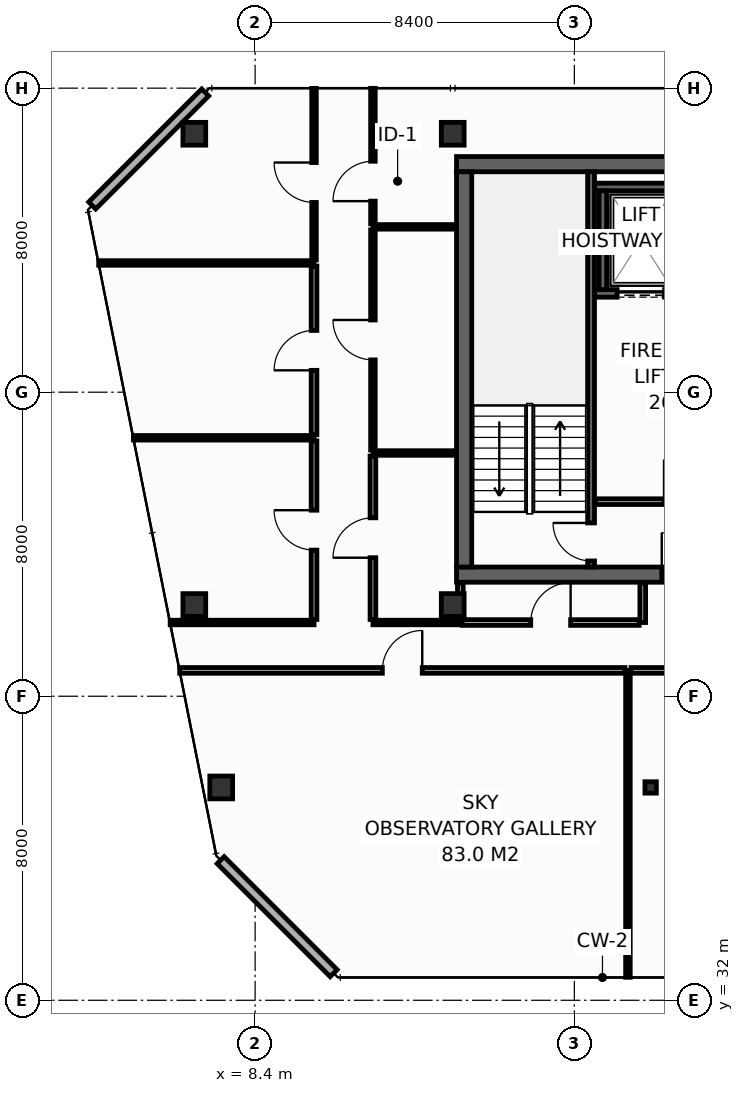
"""IFC4 building model, lengths in metres.
Left out: names, types, materials, properties, quantities, classifications, styles, units other than length and angle.
Written with IfcOpenShell. Run it as: python <this file> out.ifc"""

import sys

from ifc_helpers import new_model, si_unit, direction, frame, frame_2d, origin, origin_2d, place, context, subcontext, project, spatial, rectangle, hollow_rectangle, extrude, element, fill, save


model = new_model("IFC4")
c1 = context("Model", 3, precision=1e-05, world=origin(), true_north=direction((0.0, 1.0)))
c2 = subcontext(c1, "Body", "Model", "MODEL_VIEW")
j1 = project(units=[si_unit("LENGTHUNIT", "METRE"), si_unit("PLANEANGLEUNIT", "RADIAN")], contexts=[c1])
p1 = place(None, origin())
s1 = spatial("IfcSite", under=j1, at=p1, CompositionType="ELEMENT")
p2 = place(p1, origin())
s2 = spatial("IfcBuilding", under=s1, at=p2, CompositionType="ELEMENT")
p3 = place(p2, frame((0.0, 0.0, 299.0)))
s3 = spatial("IfcBuildingStorey", under=s2, at=p3, CompositionType="ELEMENT", Elevation=299.0)
p4 = place(p3, frame((13.7, 43.2, 0.0), z_axis=(0.0, 0.0, 1.0), x_axis=(1.0, 0.0, 0.0)))
e1 = element("IfcWall", 1, at=p4, inside=s3, PredefinedType="SHEAR", context=c2, shape_type="SweptSolid", body=[
    extrude(rectangle(XDim=32.5, YDim=0.4, at=frame_2d((16.25, 0.0))), origin(), (0.0, 0.0, 1.0), 3.55),
])
p5 = place(p4, frame((5.4, 0.0, 0.0)))
e2 = element("IfcOpeningElement", 2, at=p5, cuts=e1, PredefinedType="OPENING", context=c2, shape_type="SweptSolid", body=[
    extrude(rectangle(XDim=1.1, YDim=2.15, at=frame_2d((0.55, 1.075))), frame((0.0, 0.21, 0.0), z_axis=(0.0, -1.0, 0.0), x_axis=(1.0, 0.0, 0.0)), (0.0, 0.0, 1.0), 0.42),
])
p6 = place(p4, frame((25.6, 0.0, 0.0)))
e3 = element("IfcOpeningElement", 3, at=p6, cuts=e1, PredefinedType="OPENING", context=c2, shape_type="SweptSolid", body=[
    extrude(rectangle(XDim=1.1, YDim=2.15, at=frame_2d((0.55, 1.075))), frame((0.0, 0.21, 0.0), z_axis=(0.0, -1.0, 0.0), x_axis=(1.0, 0.0, 0.0)), (0.0, 0.0, 1.0), 0.42),
])
p7 = place(p3, frame((13.7, 54.0, 0.0), z_axis=(0.0, 0.0, 1.0), x_axis=(1.0, 0.0, 0.0)))
e4 = element("IfcWall", 4, at=p7, inside=s3, PredefinedType="SHEAR", context=c2, shape_type="SweptSolid", body=[
    extrude(rectangle(XDim=32.5, YDim=0.4, at=frame_2d((16.25, 0.0))), origin(), (0.0, 0.0, 1.0), 3.55),
])
p8 = place(p3, frame((13.9, 43.4, 0.0), z_axis=(0.0, 0.0, 1.0), x_axis=(0.0, 1.0, 0.0)))
e5 = element("IfcWall", 5, at=p8, inside=s3, PredefinedType="SHEAR", context=c2, shape_type="SweptSolid", body=[
    extrude(rectangle(XDim=10.4, YDim=0.4, at=frame_2d((5.2, 0.0))), origin(), (0.0, 0.0, 1.0), 3.55),
])
for number, where, z_axis, x_axis in (
    (6, (6.8, 54.8, 0.0), (0.0, 0.0, 1.0), (1.0, 0.0, 0.0)),
    (7, (13.6, 54.8, 0.0), (0.0, 0.0, 1.0), (1.0, 0.0, 0.0)),
    (8, (6.8, 42.4, 0.0), (0.0, 0.0, 1.0), (1.0, 0.0, 0.0)),
    (9, (13.6, 42.4, 0.0), (0.0, 0.0, 1.0), (1.0, 0.0, 0.0)),
    (10, (7.508, 37.6, 0.0), (0.0, 0.0, 1.0), (1.0, 0.0, 0.0)),
):
    element("IfcColumn", number, at=place(p3, frame(where, z_axis=z_axis, x_axis=x_axis)), inside=s3, PredefinedType="COLUMN", context=c2, shape_type="SweptSolid", body=[
        extrude(hollow_rectangle(XDim=0.6, YDim=0.6, WallThickness=0.028, at=origin_2d()), origin(), (0.0, 0.0, 1.0), 3.8),
    ])
p9 = place(p3, frame((18.808, 37.6, 0.0), z_axis=(0.0, 0.0, 1.0), x_axis=(1.0, 0.0, 0.0)))
e11 = element("IfcColumn", 11, at=p9, inside=s3, PredefinedType="COLUMN", context=c2, shape_type="SweptSolid", body=[
    extrude(hollow_rectangle(XDim=0.3, YDim=0.3, WallThickness=0.012, at=origin_2d()), origin(), (0.0, 0.0, 1.0), 3.8),
])
p10 = place(p3, frame((17.33, 50.6, 0.0), z_axis=(0.0, 0.0, 1.0), x_axis=(1.0, 0.0, 0.0)))
e12 = element("IfcWall", 12, at=p10, inside=s3, PredefinedType="SHEAR", context=c2, shape_type="SweptSolid", body=[
    extrude(rectangle(XDim=2.52, YDim=0.2, at=frame_2d((1.26, 0.0))), origin(), (0.0, 0.0, 1.0), 3.55),
])
p11 = place(p10, frame((0.595, 0.0, 0.0)))
e13 = element("IfcOpeningElement", 13, at=p11, cuts=e12, PredefinedType="OPENING", context=c2, shape_type="SweptSolid", body=[
    extrude(rectangle(XDim=1.25, YDim=2.3, at=frame_2d((0.625, 1.15))), frame((0.0, 0.11, 0.0), z_axis=(0.0, -1.0, 0.0), x_axis=(1.0, 0.0, 0.0)), (0.0, 0.0, 1.0), 0.22),
])
p12 = place(p3, frame((17.33, 53.4, 0.0), z_axis=(0.0, 0.0, 1.0), x_axis=(1.0, 0.0, 0.0)))
e14 = element("IfcWall", 14, at=p12, inside=s3, PredefinedType="SHEAR", context=c2, shape_type="SweptSolid", body=[
    extrude(rectangle(XDim=2.52, YDim=0.2, at=frame_2d((1.26, 0.0))), origin(), (0.0, 0.0, 1.0), 3.55),
])
p13 = place(p3, frame((17.55, 50.7, 0.0), z_axis=(0.0, 0.0, 1.0), x_axis=(0.0, 1.0, 0.0)))
e15 = element("IfcWall", 15, at=p13, inside=s3, PredefinedType="SHEAR", context=c2, shape_type="SweptSolid", body=[
    extrude(rectangle(XDim=2.6, YDim=0.2, at=frame_2d((1.3, 0.0))), origin(), (0.0, 0.0, 1.0), 3.55),
])
p14 = place(p3, frame((17.24, 43.4, 0.0), z_axis=(0.0, 0.0, 1.0), x_axis=(0.0, 1.0, 0.0)))
e16 = element("IfcWall", 16, at=p14, inside=s3, PredefinedType="SHEAR", context=c2, shape_type="SweptSolid", body=[
    extrude(rectangle(XDim=10.4, YDim=0.18, at=frame_2d((5.2, 0.0))), origin(), (0.0, 0.0, 1.0), 3.55),
])
p15 = place(p14, frame((0.16, 0.0, 0.0)))
e17 = element("IfcOpeningElement", 17, at=p15, cuts=e16, PredefinedType="OPENING", context=c2, shape_type="SweptSolid", body=[
    extrude(rectangle(XDim=1.0, YDim=2.15, at=frame_2d((0.5, 1.075))), frame((0.0, 0.1, 0.0), z_axis=(0.0, -1.0, 0.0), x_axis=(1.0, 0.0, 0.0)), (0.0, 0.0, 1.0), 0.2),
])
p16 = place(p3, frame((17.36, 45.12, 0.0), z_axis=(0.0, 0.0, 1.0), x_axis=(1.0, 0.0, 0.0)))
e18 = element("IfcWall", 18, at=p16, inside=s3, PredefinedType="PARTITIONING", context=c2, shape_type="SweptSolid", body=[
    extrude(rectangle(XDim=5.14, YDim=0.15, at=frame_2d((2.57, 0.0))), origin(), (0.0, 0.0, 1.0), 3.55),
])
p17 = place(p16, frame((1.8, 0.0, 0.0)))
e19 = element("IfcOpeningElement", 19, at=p17, cuts=e18, PredefinedType="OPENING", context=c2, shape_type="SweptSolid", body=[
    extrude(rectangle(XDim=1.1, YDim=2.15, at=frame_2d((0.55, 1.075))), frame((0.0, 0.085, 0.0), z_axis=(0.0, -1.0, 0.0), x_axis=(1.0, 0.0, 0.0)), (0.0, 0.0, 1.0), 0.17),
])
p18 = place(p3, frame((7.493, 35.687, 0.0), z_axis=(0.0, 0.0, 1.0), x_axis=(0.70707775441, -0.707135806771, 0.0)))
e20 = element("IfcWall", 20, at=p18, inside=s3, PredefinedType="STANDARD", context=c2, shape_type="SweptSolid", body=[
    extrude(rectangle(XDim=4.206, YDim=0.26, at=frame_2d((2.103, 0.0))), origin(), (0.0, 0.0, 1.0), 3.55),
])
p19 = place(p3, frame((7.087, 55.887, 0.0), z_axis=(0.0, 0.0, 1.0), x_axis=(-0.707106781187, -0.707106781187, 0.0)))
e21 = element("IfcWall", 21, at=p19, inside=s3, PredefinedType="STANDARD", context=c2, shape_type="SweptSolid", body=[
    extrude(rectangle(XDim=4.206, YDim=0.26, at=frame_2d((2.103, 0.0))), origin(), (0.0, 0.0, 1.0), 3.55),
])
p20 = place(p3, frame((6.164, 41.94, 0.0), z_axis=(0.0, 0.0, 1.0), x_axis=(1.0, 0.0, 0.0)))
e22 = element("IfcWall", 22, at=p20, inside=s3, PredefinedType="PARTITIONING", context=c2, shape_type="SweptSolid", body=[
    extrude(rectangle(XDim=3.786, YDim=0.12, at=frame_2d((1.893, 0.0))), origin(), (0.0, 0.0, 1.0), 3.085),
])
p21 = place(p3, frame((11.5, 41.94, 0.0), z_axis=(0.0, 0.0, 1.0), x_axis=(1.0, 0.0, 0.0)))
e23 = element("IfcWall", 23, at=p21, inside=s3, PredefinedType="PARTITIONING", context=c2, shape_type="SweptSolid", body=[
    extrude(rectangle(XDim=2.35, YDim=0.12, at=frame_2d((1.175, 0.0))), origin(), (0.0, 0.0, 1.0), 3.55),
])
p22 = place(p3, frame((11.5, 52.35, 0.0), z_axis=(0.0, 0.0, 1.0), x_axis=(1.0, 0.0, 0.0)))
e24 = element("IfcWall", 24, at=p22, inside=s3, PredefinedType="PARTITIONING", context=c2, shape_type="SweptSolid", body=[
    extrude(rectangle(XDim=2.18, YDim=0.12, at=frame_2d((1.09, 0.0))), origin(), (0.0, 0.0, 1.0), 3.55),
])
p23 = place(p3, frame((11.5, 52.43, 0.0), z_axis=(0.0, 0.0, 1.0), x_axis=(0.0, 1.0, 0.0)))
e25 = element("IfcWall", 25, at=p23, inside=s3, PredefinedType="PARTITIONING", context=c2, shape_type="SweptSolid", body=[
    extrude(rectangle(XDim=3.565, YDim=0.12, at=frame_2d((1.783, 0.0))), origin(), (0.0, 0.0, 1.0), 2.935),
])
p24 = place(p23, frame((0.597, 0.0, 0.0)))
e26 = element("IfcOpeningElement", 26, at=p24, cuts=e25, PredefinedType="OPENING", context=c2, shape_type="SweptSolid", body=[
    extrude(rectangle(XDim=1.05, YDim=2.15, at=frame_2d((0.525, 1.075))), frame((0.0, 0.07, 0.0), z_axis=(0.0, -1.0, 0.0), x_axis=(1.0, 0.0, 0.0)), (0.0, 0.0, 1.0), 0.14),
])
p25 = place(p3, frame((5.198, 46.8, 0.0), z_axis=(0.0, 0.0, 1.0), x_axis=(1.0, 0.0, 0.0)))
e27 = element("IfcWall", 27, at=p25, inside=s3, PredefinedType="PARTITIONING", context=c2, shape_type="SweptSolid", body=[
    extrude(rectangle(XDim=4.752, YDim=0.12, at=frame_2d((2.376, 0.0))), origin(), (0.0, 0.0, 1.0), 2.947),
])
p26 = place(p3, frame((4.283, 51.4, 0.0), z_axis=(0.0, 0.0, 1.0), x_axis=(1.0, 0.0, 0.0)))
e28 = element("IfcWall", 28, at=p26, inside=s3, PredefinedType="PARTITIONING", context=c2, shape_type="SweptSolid", body=[
    extrude(rectangle(XDim=5.667, YDim=0.12, at=frame_2d((2.833, 0.0))), origin(), (0.0, 0.0, 1.0), 2.947),
])
p27 = place(p3, frame((9.95, 42.02, 0.0), z_axis=(0.0, 0.0, 1.0), x_axis=(0.0, 1.0, 0.0)))
e29 = element("IfcWall", 29, at=p27, inside=s3, PredefinedType="PARTITIONING", context=c2, shape_type="SweptSolid", body=[
    extrude(rectangle(XDim=4.7, YDim=0.15, at=frame_2d((2.35, 0.0))), origin(), (0.0, 0.0, 1.0), 2.947),
])
p28 = place(p27, frame((1.825, 0.0, 0.0)))
e30 = element("IfcOpeningElement", 30, at=p28, cuts=e29, PredefinedType="OPENING", context=c2, shape_type="SweptSolid", body=[
    extrude(rectangle(XDim=1.05, YDim=2.15, at=frame_2d((0.525, 1.075))), frame((0.0, 0.085, 0.0), z_axis=(0.0, -1.0, 0.0), x_axis=(1.0, 0.0, 0.0)), (0.0, 0.0, 1.0), 0.17),
])
p29 = place(p3, frame((9.95, 46.88, 0.0), z_axis=(0.0, 0.0, 1.0), x_axis=(0.0, 1.0, 0.0)))
e31 = element("IfcWall", 31, at=p29, inside=s3, PredefinedType="PARTITIONING", context=c2, shape_type="SweptSolid", body=[
    extrude(rectangle(XDim=4.44, YDim=0.15, at=frame_2d((2.22, 0.0))), origin(), (0.0, 0.0, 1.0), 3.55),
])
p30 = place(p29, frame((1.695, 0.0, 0.0)))
e32 = element("IfcOpeningElement", 32, at=p30, cuts=e31, PredefinedType="OPENING", context=c2, shape_type="SweptSolid", body=[
    extrude(rectangle(XDim=1.05, YDim=2.15, at=frame_2d((0.525, 1.075))), frame((0.0, 0.085, 0.0), z_axis=(0.0, -1.0, 0.0), x_axis=(1.0, 0.0, 0.0)), (0.0, 0.0, 1.0), 0.17),
])
p31 = place(p3, frame((9.95, 51.48, 0.0), z_axis=(0.0, 0.0, 1.0), x_axis=(0.0, 1.0, 0.0)))
e33 = element("IfcWall", 33, at=p31, inside=s3, PredefinedType="PARTITIONING", context=c2, shape_type="SweptSolid", body=[
    extrude(rectangle(XDim=4.515, YDim=0.12, at=frame_2d((2.258, 0.0))), origin(), (0.0, 0.0, 1.0), 2.935),
])
p32 = place(p31, frame((1.513, 0.0, 0.0)))
e34 = element("IfcOpeningElement", 34, at=p32, cuts=e33, PredefinedType="OPENING", context=c2, shape_type="SweptSolid", body=[
    extrude(rectangle(XDim=1.05, YDim=2.15, at=frame_2d((0.525, 1.075))), frame((0.0, 0.07, 0.0), z_axis=(0.0, -1.0, 0.0), x_axis=(1.0, 0.0, 0.0)), (0.0, 0.0, 1.0), 0.14),
])
p33 = place(p3, frame((11.5, 46.4, 0.0), z_axis=(0.0, 0.0, 1.0), x_axis=(1.0, 0.0, 0.0)))
e35 = element("IfcWall", 35, at=p33, inside=s3, PredefinedType="PARTITIONING", context=c2, shape_type="SweptSolid", body=[
    extrude(rectangle(XDim=2.18, YDim=0.12, at=frame_2d((1.09, 0.0))), origin(), (0.0, 0.0, 1.0), 3.55),
])
p34 = place(p3, frame((11.5, 42.02, 0.0), z_axis=(0.0, 0.0, 1.0), x_axis=(0.0, 1.0, 0.0)))
e36 = element("IfcWall", 36, at=p34, inside=s3, PredefinedType="PARTITIONING", context=c2, shape_type="SweptSolid", body=[
    extrude(rectangle(XDim=4.3, YDim=0.15, at=frame_2d((2.15, 0.0))), origin(), (0.0, 0.0, 1.0), 2.947),
])
p35 = place(p34, frame((1.625, 0.0, 0.0)))
e37 = element("IfcOpeningElement", 37, at=p35, cuts=e36, PredefinedType="OPENING", context=c2, shape_type="SweptSolid", body=[
    extrude(rectangle(XDim=1.05, YDim=2.15, at=frame_2d((0.525, 1.075))), frame((0.0, 0.085, 0.0), z_axis=(0.0, -1.0, 0.0), x_axis=(1.0, 0.0, 0.0)), (0.0, 0.0, 1.0), 0.17),
])
p36 = place(p3, frame((11.5, 46.48, 0.0), z_axis=(0.0, 0.0, 1.0), x_axis=(0.0, 1.0, 0.0)))
e38 = element("IfcWall", 38, at=p36, inside=s3, PredefinedType="PARTITIONING", context=c2, shape_type="SweptSolid", body=[
    extrude(rectangle(XDim=5.79, YDim=0.12, at=frame_2d((2.895, 0.0))), origin(), (0.0, 0.0, 1.0), 3.55),
])
p37 = place(p36, frame((2.37, 0.0, 0.0)))
e39 = element("IfcOpeningElement", 39, at=p37, cuts=e38, PredefinedType="OPENING", context=c2, shape_type="SweptSolid", body=[
    extrude(rectangle(XDim=1.05, YDim=2.15, at=frame_2d((0.525, 1.075))), frame((0.0, 0.07, 0.0), z_axis=(0.0, -1.0, 0.0), x_axis=(1.0, 0.0, 0.0)), (0.0, 0.0, 1.0), 0.14),
])
p38 = place(p3, frame((13.8, 42.02, 0.0), z_axis=(0.0, 0.0, 1.0), x_axis=(0.0, 1.0, 0.0)))
e40 = element("IfcWall", 40, at=p38, inside=s3, PredefinedType="PARTITIONING", context=c2, shape_type="SweptSolid", body=[
    extrude(rectangle(XDim=0.96, YDim=0.15, at=frame_2d((0.48, 0.0))), origin(), (0.0, 0.0, 1.0), 3.55),
])
p39 = place(p3, frame((18.6, 41.94, 0.0), z_axis=(0.0, 0.0, 1.0), x_axis=(0.0, 1.0, 0.0)))
e41 = element("IfcWall", 41, at=p39, inside=s3, PredefinedType="PARTITIONING", context=c2, shape_type="SweptSolid", body=[
    extrude(rectangle(XDim=1.04, YDim=0.15, at=frame_2d((0.52, 0.0))), origin(), (0.0, 0.0, 1.0), 3.55),
])
p40 = place(p3, frame((13.85, 41.94, 0.0), z_axis=(0.0, 0.0, 1.0), x_axis=(1.0, 0.0, 0.0)))
e42 = element("IfcWall", 42, at=p40, inside=s3, PredefinedType="PARTITIONING", context=c2, shape_type="SweptSolid", body=[
    extrude(rectangle(XDim=4.655, YDim=0.15, at=frame_2d((2.327, 0.0))), origin(), (0.0, 0.0, 1.0), 3.55),
])
p41 = place(p40, frame((1.802, 0.0, 0.0)))
e43 = element("IfcOpeningElement", 43, at=p41, cuts=e42, PredefinedType="OPENING", context=c2, shape_type="SweptSolid", body=[
    extrude(rectangle(XDim=1.05, YDim=2.15, at=frame_2d((0.525, 1.075))), frame((0.0, 0.085, 0.0), z_axis=(0.0, -1.0, 0.0), x_axis=(1.0, 0.0, 0.0)), (0.0, 0.0, 1.0), 0.17),
])
p42 = place(p3, frame((18.21, 32.605, 0.0), z_axis=(0.0, 0.0, 1.0), x_axis=(0.0, 1.0, 0.0)))
e44 = element("IfcWall", 44, at=p42, inside=s3, PredefinedType="PARTITIONING", context=c2, shape_type="SweptSolid", body=[
    extrude(rectangle(XDim=8.075, YDim=0.12, at=frame_2d((4.038, 0.0))), origin(), (0.0, 0.0, 1.0), 3.047),
])
p43 = place(p3, frame((6.415, 40.68, 0.0), z_axis=(0.0, 0.0, 1.0), x_axis=(1.0, 0.0, 0.0)))
e45 = element("IfcWall", 45, at=p43, inside=s3, PredefinedType="PARTITIONING", context=c2, shape_type="SweptSolid", body=[
    extrude(rectangle(XDim=11.715, YDim=0.15, at=frame_2d((5.857, 0.0))), origin(), (0.0, 0.0, 1.0), 3.085),
])
p44 = place(p43, frame((5.333, 0.0, 0.0)))
e46 = element("IfcOpeningElement", 46, at=p44, cuts=e45, PredefinedType="OPENING", context=c2, shape_type="SweptSolid", body=[
    extrude(rectangle(XDim=1.05, YDim=2.15, at=frame_2d((0.525, 1.075))), frame((0.0, 0.085, 0.0), z_axis=(0.0, -1.0, 0.0), x_axis=(1.0, 0.0, 0.0)), (0.0, 0.0, 1.0), 0.17),
])
p45 = place(p3, frame((18.29, 40.68, 0.0), z_axis=(0.0, 0.0, 1.0), x_axis=(1.0, 0.0, 0.0)))
e47 = element("IfcWall", 47, at=p45, inside=s3, PredefinedType="PARTITIONING", context=c2, shape_type="SweptSolid", body=[
    extrude(rectangle(XDim=9.262, YDim=0.15, at=frame_2d((4.631, 0.0))), origin(), (0.0, 0.0, 1.0), 3.047),
])
p46 = place(p45, frame((4.106, 0.0, 0.0)))
e48 = element("IfcOpeningElement", 48, at=p46, cuts=e47, PredefinedType="OPENING", context=c2, shape_type="SweptSolid", body=[
    extrude(rectangle(XDim=1.05, YDim=2.15, at=frame_2d((0.525, 1.075))), frame((0.0, 0.085, 0.0), z_axis=(0.0, -1.0, 0.0), x_axis=(1.0, 0.0, 0.0)), (0.0, 0.0, 1.0), 0.17),
])
p47 = place(p11, origin())
e49 = element("IfcDoor", 49, at=p47, inside=s3, OperationType="SLIDING_TO_LEFT", PredefinedType="DOOR", context=c2, shape_type="SweptSolid", body=[
    extrude(rectangle(XDim=1.25, YDim=2.3, at=frame_2d((0.625, 1.15))), frame((0.0, 0.025, 0.0), z_axis=(0.0, -1.0, 0.0), x_axis=(1.0, 0.0, 0.0)), (0.0, 0.0, 1.0), 0.05),
])
fill(e13, e49)
p48 = place(p15, origin())
e50 = element("IfcDoor", 50, at=p48, inside=s3, OperationType="SINGLE_SWING_RIGHT", PredefinedType="DOOR", context=c2, shape_type="SweptSolid", body=[
    extrude(rectangle(XDim=1.0, YDim=2.15, at=frame_2d((0.5, 1.075))), frame((0.0, 0.025, 0.0), z_axis=(0.0, -1.0, 0.0), x_axis=(1.0, 0.0, 0.0)), (0.0, 0.0, 1.0), 0.05),
])
fill(e17, e50)
p49 = place(p17, origin())
e51 = element("IfcDoor", 51, at=p49, inside=s3, OperationType="SINGLE_SWING_LEFT", PredefinedType="DOOR", context=c2, shape_type="SweptSolid", body=[
    extrude(rectangle(XDim=1.1, YDim=2.15, at=frame_2d((0.55, 1.075))), frame((0.0, 0.025, 0.0), z_axis=(0.0, -1.0, 0.0), x_axis=(1.0, 0.0, 0.0)), (0.0, 0.0, 1.0), 0.05),
])
fill(e19, e51)
p50 = place(p5, origin())
e52 = element("IfcDoor", 52, at=p50, inside=s3, OperationType="SINGLE_SWING_LEFT", PredefinedType="DOOR", context=c2, shape_type="SweptSolid", body=[
    extrude(rectangle(XDim=1.1, YDim=2.15, at=frame_2d((0.55, 1.075))), frame((0.0, 0.025, 0.0), z_axis=(0.0, -1.0, 0.0), x_axis=(1.0, 0.0, 0.0)), (0.0, 0.0, 1.0), 0.05),
])
fill(e2, e52)
p51 = place(p24, origin())
e53 = element("IfcDoor", 53, at=p51, inside=s3, OperationType="SINGLE_SWING_LEFT", PredefinedType="DOOR", context=c2, shape_type="SweptSolid", body=[
    extrude(rectangle(XDim=1.05, YDim=2.15, at=frame_2d((0.525, 1.075))), frame((0.0, 0.025, 0.0), z_axis=(0.0, -1.0, 0.0), x_axis=(1.0, 0.0, 0.0)), (0.0, 0.0, 1.0), 0.05),
])
fill(e26, e53)
p52 = place(p28, origin())
e54 = element("IfcDoor", 54, at=p52, inside=s3, OperationType="SINGLE_SWING_RIGHT", PredefinedType="DOOR", context=c2, shape_type="SweptSolid", body=[
    extrude(rectangle(XDim=1.05, YDim=2.15, at=frame_2d((0.525, 1.075))), frame((0.0, 0.025, 0.0), z_axis=(0.0, -1.0, 0.0), x_axis=(1.0, 0.0, 0.0)), (0.0, 0.0, 1.0), 0.05),
])
fill(e30, e54)
p53 = place(p30, origin())
e55 = element("IfcDoor", 55, at=p53, inside=s3, OperationType="SINGLE_SWING_LEFT", PredefinedType="DOOR", context=c2, shape_type="SweptSolid", body=[
    extrude(rectangle(XDim=1.05, YDim=2.15, at=frame_2d((0.525, 1.075))), frame((0.0, 0.025, 0.0), z_axis=(0.0, -1.0, 0.0), x_axis=(1.0, 0.0, 0.0)), (0.0, 0.0, 1.0), 0.05),
])
fill(e32, e55)
p54 = place(p32, origin())
e56 = element("IfcDoor", 56, at=p54, inside=s3, OperationType="SINGLE_SWING_RIGHT", PredefinedType="DOOR", context=c2, shape_type="SweptSolid", body=[
    extrude(rectangle(XDim=1.05, YDim=2.15, at=frame_2d((0.525, 1.075))), frame((0.0, 0.025, 0.0), z_axis=(0.0, -1.0, 0.0), x_axis=(1.0, 0.0, 0.0)), (0.0, 0.0, 1.0), 0.05),
])
fill(e34, e56)
p55 = place(p35, origin())
e57 = element("IfcDoor", 57, at=p55, inside=s3, OperationType="SINGLE_SWING_LEFT", PredefinedType="DOOR", context=c2, shape_type="SweptSolid", body=[
    extrude(rectangle(XDim=1.05, YDim=2.15, at=frame_2d((0.525, 1.075))), frame((0.0, 0.025, 0.0), z_axis=(0.0, -1.0, 0.0), x_axis=(1.0, 0.0, 0.0)), (0.0, 0.0, 1.0), 0.05),
])
fill(e37, e57)
p56 = place(p37, origin())
e58 = element("IfcDoor", 58, at=p56, inside=s3, OperationType="SINGLE_SWING_RIGHT", PredefinedType="DOOR", context=c2, shape_type="SweptSolid", body=[
    extrude(rectangle(XDim=1.05, YDim=2.15, at=frame_2d((0.525, 1.075))), frame((0.0, 0.025, 0.0), z_axis=(0.0, -1.0, 0.0), x_axis=(1.0, 0.0, 0.0)), (0.0, 0.0, 1.0), 0.05),
])
fill(e39, e58)
p57 = place(p41, origin())
e59 = element("IfcDoor", 59, at=p57, inside=s3, OperationType="SINGLE_SWING_RIGHT", PredefinedType="DOOR", context=c2, shape_type="SweptSolid", body=[
    extrude(rectangle(XDim=1.05, YDim=2.15, at=frame_2d((0.525, 1.075))), frame((0.0, 0.025, 0.0), z_axis=(0.0, -1.0, 0.0), x_axis=(1.0, 0.0, 0.0)), (0.0, 0.0, 1.0), 0.05),
])
fill(e43, e59)
p58 = place(p44, origin())
e60 = element("IfcDoor", 60, at=p58, inside=s3, OperationType="SINGLE_SWING_RIGHT", PredefinedType="DOOR", context=c2, shape_type="SweptSolid", body=[
    extrude(rectangle(XDim=1.05, YDim=2.15, at=frame_2d((0.525, 1.075))), frame((0.0, 0.025, 0.0), z_axis=(0.0, -1.0, 0.0), x_axis=(1.0, 0.0, 0.0)), (0.0, 0.0, 1.0), 0.05),
])
fill(e46, e60)
save(model, sys.argv[1])
